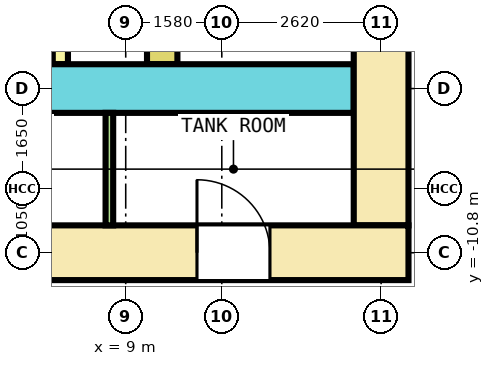
"""IFC4 building model, lengths in metres.
Left out: names, types, materials, properties, quantities, classifications, styles, units other than length and angle.
Written with IfcOpenShell. Run it as: python <this file> out.ifc"""

import sys

from ifc_helpers import new_model, si_unit, direction, frame, frame_2d, origin, place, context, subcontext, project, spatial, rectangle, extrude, element, fill, save


model = new_model("IFC4")
c1 = context("Model", 3, precision=1e-05, world=origin(), true_north=direction((0.0, 1.0)))
c2 = subcontext(c1, "Body", "Model", "MODEL_VIEW")
j1 = project(units=[si_unit("LENGTHUNIT", "METRE"), si_unit("PLANEANGLEUNIT", "RADIAN")], contexts=[c1])
p1 = place(None, origin())
s1 = spatial("IfcSite", under=j1, at=p1, CompositionType="ELEMENT")
p2 = place(p1, origin())
s2 = spatial("IfcBuilding", under=s1, at=p2, CompositionType="ELEMENT")
p3 = place(p2, frame((0.0, 0.0, -5.2)))
s3 = spatial("IfcBuildingStorey", under=s2, at=p3, CompositionType="ELEMENT", Elevation=-5.2)
p4 = place(p3, frame((-13.65, -10.8, 0.0), z_axis=(0.0, 0.0, 1.0), x_axis=(1.0, 0.0, 0.0)))
e1 = element("IfcWall", 1, at=p4, inside=s3, PredefinedType="SHEAR", context=c2, shape_type="SweptSolid", body=[
    extrude(rectangle(XDim=27.3, YDim=0.9, at=frame_2d((13.65, 0.0))), origin(), (0.0, 0.0, 1.0), 4.9),
])
p5 = place(p4, frame((2.325, 0.0, 0.0)))
e2 = element("IfcOpeningElement", 2, at=p5, cuts=e1, PredefinedType="OPENING", context=c2, shape_type="SweptSolid", body=[
    extrude(rectangle(XDim=1.2, YDim=2.1, at=frame_2d((0.6, 1.05))), frame((0.0, 0.46, 0.0), z_axis=(0.0, -1.0, 0.0), x_axis=(1.0, 0.0, 0.0)), (0.0, 0.0, 1.0), 0.92),
])
p6 = place(p4, frame((6.469, 0.0, 0.0)))
e3 = element("IfcOpeningElement", 3, at=p6, cuts=e1, PredefinedType="OPENING", context=c2, shape_type="SweptSolid", body=[
    extrude(rectangle(XDim=1.2, YDim=2.1, at=frame_2d((0.6, 1.05))), frame((0.0, 0.46, 0.0), z_axis=(0.0, -1.0, 0.0), x_axis=(1.0, 0.0, 0.0)), (0.0, 0.0, 1.0), 0.92),
])
p7 = place(p4, frame((10.581, 0.0, 0.0)))
e4 = element("IfcOpeningElement", 4, at=p7, cuts=e1, PredefinedType="OPENING", context=c2, shape_type="SweptSolid", body=[
    extrude(rectangle(XDim=1.2, YDim=2.1, at=frame_2d((0.6, 1.05))), frame((0.0, 0.46, 0.0), z_axis=(0.0, -1.0, 0.0), x_axis=(1.0, 0.0, 0.0)), (0.0, 0.0, 1.0), 0.92),
])
p8 = place(p4, frame((19.772, 0.0, 0.0)))
e5 = element("IfcOpeningElement", 5, at=p8, cuts=e1, PredefinedType="OPENING", context=c2, shape_type="SweptSolid", body=[
    extrude(rectangle(XDim=1.2, YDim=2.1, at=frame_2d((0.6, 1.05))), frame((0.0, 0.46, 0.0), z_axis=(0.0, -1.0, 0.0), x_axis=(1.0, 0.0, 0.0)), (0.0, 0.0, 1.0), 0.92),
])
p9 = place(p4, frame((23.822, 0.0, 0.0)))
e6 = element("IfcOpeningElement", 6, at=p9, cuts=e1, PredefinedType="OPENING", context=c2, shape_type="SweptSolid", body=[
    extrude(rectangle(XDim=1.2, YDim=2.1, at=frame_2d((0.6, 1.05))), frame((0.0, 0.46, 0.0), z_axis=(0.0, -1.0, 0.0), x_axis=(1.0, 0.0, 0.0)), (0.0, 0.0, 1.0), 0.92),
])
p10 = place(p4, frame((15.2, 0.0, 0.0)))
e7 = element("IfcOpeningElement", 7, at=p10, cuts=e1, PredefinedType="OPENING", context=c2, shape_type="SweptSolid", body=[
    extrude(rectangle(XDim=1.2, YDim=2.1, at=frame_2d((0.6, 1.05))), frame((0.0, 0.46, 0.0), z_axis=(0.0, -1.0, 0.0), x_axis=(1.0, 0.0, 0.0)), (0.0, 0.0, 1.0), 0.92),
])
p11 = place(p3, frame((13.2, -10.35, 0.0), z_axis=(0.0, 0.0, 1.0), x_axis=(0.0, 1.0, 0.0)))
e8 = element("IfcWall", 8, at=p11, inside=s3, PredefinedType="SHEAR", context=c2, shape_type="SweptSolid", body=[
    extrude(rectangle(XDim=20.7, YDim=0.9, at=frame_2d((10.35, 0.0))), origin(), (0.0, 0.0, 1.0), 4.9),
])
p12 = place(p11, frame((9.15, 0.0, 0.0)))
e9 = element("IfcOpeningElement", 9, at=p12, cuts=e8, PredefinedType="OPENING", context=c2, shape_type="SweptSolid", body=[
    extrude(rectangle(XDim=2.4, YDim=2.1, at=frame_2d((1.2, 1.05))), frame((0.0, 0.46, 0.0), z_axis=(0.0, -1.0, 0.0), x_axis=(1.0, 0.0, 0.0)), (0.0, 0.0, 1.0), 0.92),
])
p13 = place(p11, frame((3.55, 0.0, 0.0)))
e10 = element("IfcOpeningElement", 10, at=p13, cuts=e8, PredefinedType="OPENING", context=c2, shape_type="SweptSolid", body=[
    extrude(rectangle(XDim=1.0, YDim=2.1, at=frame_2d((0.5, 1.05))), frame((0.0, 0.46, 0.0), z_axis=(0.0, -1.0, 0.0), x_axis=(1.0, 0.0, 0.0)), (0.0, 0.0, 1.0), 0.92),
])
p14 = place(p3, frame((-12.75, -8.1, 0.0), z_axis=(0.0, 0.0, 1.0), x_axis=(1.0, 0.0, 0.0)))
e11 = element("IfcWall", 11, at=p14, inside=s3, PredefinedType="SHEAR", context=c2, shape_type="SweptSolid", body=[
    extrude(rectangle(XDim=25.5, YDim=0.8, at=frame_2d((12.75, 0.0))), origin(), (0.0, 0.0, 1.0), 4.9),
])
p15 = place(p14, frame((14.3, 0.0, 0.0)))
e12 = element("IfcOpeningElement", 12, at=p15, cuts=e11, PredefinedType="OPENING", context=c2, shape_type="SweptSolid", body=[
    extrude(rectangle(XDim=1.2, YDim=2.1, at=frame_2d((0.6, 1.05))), frame((0.0, 0.41, 0.0), z_axis=(0.0, -1.0, 0.0), x_axis=(1.0, 0.0, 0.0)), (0.0, 0.0, 1.0), 0.82),
])
p16 = place(p3, frame((9.6, -7.7, 0.0), z_axis=(0.0, 0.0, 1.0), x_axis=(0.0, 1.0, 0.0)))
e13 = element("IfcWall", 13, at=p16, inside=s3, PredefinedType="SHEAR", context=c2, shape_type="SweptSolid", body=[
    extrude(rectangle(XDim=15.4, YDim=0.5, at=frame_2d((7.7, 0.0))), origin(), (0.0, 0.0, 1.0), 4.9),
])
p17 = place(p16, frame((6.5, 0.0, 0.0)))
e14 = element("IfcOpeningElement", 14, at=p17, cuts=e13, PredefinedType="OPENING", context=c2, shape_type="SweptSolid", body=[
    extrude(rectangle(XDim=2.4, YDim=2.1, at=frame_2d((1.2, 1.05))), frame((0.0, 0.26, 0.0), z_axis=(0.0, -1.0, 0.0), x_axis=(1.0, 0.0, 0.0)), (0.0, 0.0, 1.0), 0.52),
])
p18 = place(p16, frame((0.9, 0.0, 0.0)))
e15 = element("IfcOpeningElement", 15, at=p18, cuts=e13, PredefinedType="OPENING", context=c2, shape_type="SweptSolid", body=[
    extrude(rectangle(XDim=1.0, YDim=2.1, at=frame_2d((0.5, 1.05))), frame((0.0, 0.26, 0.0), z_axis=(0.0, -1.0, 0.0), x_axis=(1.0, 0.0, 0.0)), (0.0, 0.0, 1.0), 0.52),
])
p19 = place(p3, frame((7.925, -7.7, 0.0), z_axis=(0.0, 0.0, 1.0), x_axis=(0.0, 1.0, 0.0)))
e16 = element("IfcWall", 16, at=p19, inside=s3, PredefinedType="SOLIDWALL", context=c2, shape_type="SweptSolid", body=[
    extrude(rectangle(XDim=2.8, YDim=0.25, at=frame_2d((1.4, 0.0))), origin(), (0.0, 0.0, 1.0), 4.9),
])
p20 = place(p3, frame((8.731, -10.35, 0.0), z_axis=(0.0, 0.0, 1.0), x_axis=(0.0, 1.0, 0.0)))
e17 = element("IfcWall", 17, at=p20, inside=s3, PredefinedType="PARTITIONING", context=c2, shape_type="SweptSolid", body=[
    extrude(rectangle(XDim=1.85, YDim=0.125, at=frame_2d((0.925, 0.0))), origin(), (0.0, 0.0, 1.0), 4.9),
])
p21 = place(p9, origin())
e18 = element("IfcDoor", 18, at=p21, inside=s3, OperationType="SINGLE_SWING_LEFT", PredefinedType="DOOR", context=c2, shape_type="SweptSolid", body=[
    extrude(rectangle(XDim=1.2, YDim=2.1, at=frame_2d((0.6, 1.05))), frame((0.0, 0.3, 0.0), z_axis=(0.0, -1.0, 0.0), x_axis=(1.0, 0.0, 0.0)), (0.0, 0.0, 1.0), 0.6),
])
fill(e6, e18)
save(model, sys.argv[1])
